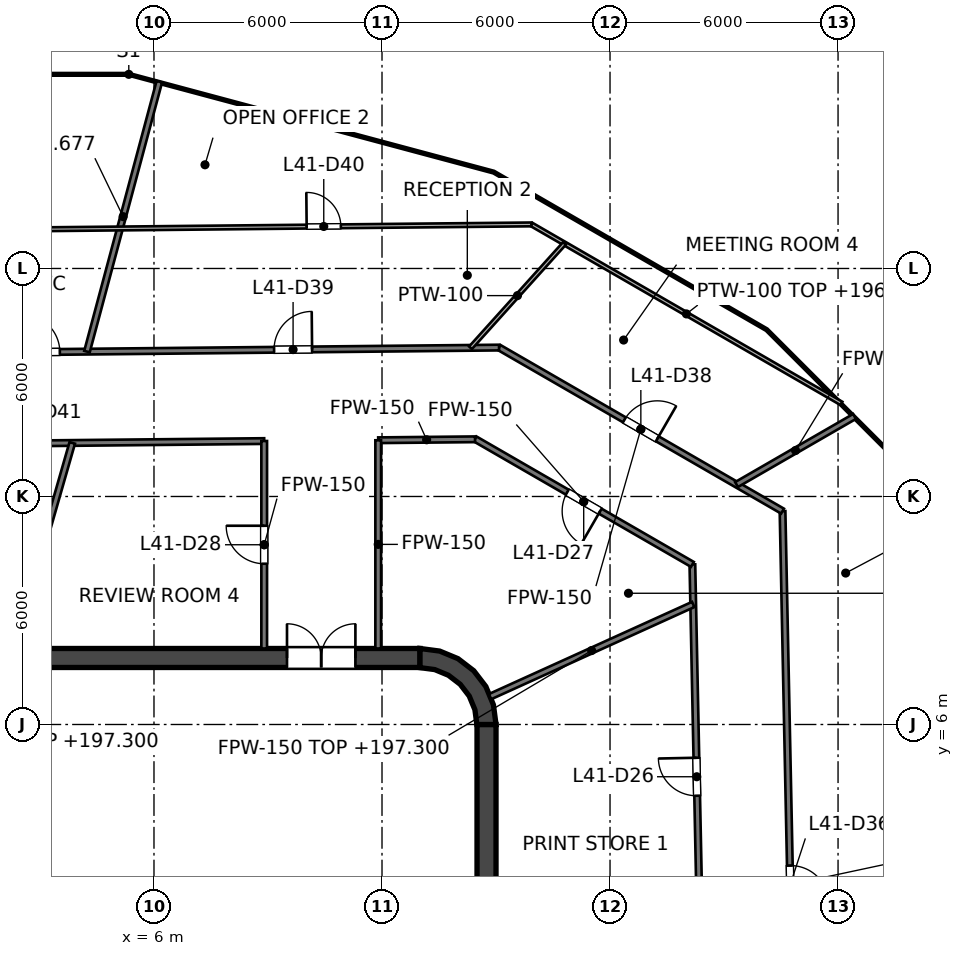
"""IFC4 building model, lengths in metres.
Left out: names, types, materials, properties, quantities, classifications, styles, units other than length and angle.
Written with IfcOpenShell. Run it as: python <this file> out.ifc"""

import sys

from ifc_helpers import new_model, si_unit, direction, frame, frame_2d, origin, place, context, subcontext, project, spatial, polyline, rectangle, outline, extrude, element, fill, save


model = new_model("IFC4")
c1 = context("Model", 3, precision=1e-05, world=origin(), true_north=direction((0.0, 1.0)))
c2 = subcontext(c1, "Body", "Model", "MODEL_VIEW")
j1 = project(units=[si_unit("LENGTHUNIT", "METRE"), si_unit("PLANEANGLEUNIT", "RADIAN")], contexts=[c1])
p1 = place(None, origin())
s1 = spatial("IfcSite", under=j1, at=p1, CompositionType="ELEMENT")
p2 = place(p1, origin())
s2 = spatial("IfcBuilding", under=s1, at=p2, CompositionType="ELEMENT")
p3 = place(p2, frame((0.0, 0.0, 193.6)))
s3 = spatial("IfcBuildingStorey", under=s2, at=p3, CompositionType="ELEMENT", Elevation=193.6)
p4 = place(p3, frame((-13.0, 7.75, 0.0), z_axis=(0.0, 0.0, 1.0), x_axis=(1.0, 0.0, 0.0)))
e1 = element("IfcWall", 1, at=p4, inside=s3, PredefinedType="SHEAR", context=c2, shape_type="SweptSolid", body=[
    extrude(rectangle(XDim=26.0, YDim=0.5, at=frame_2d((13.0, 0.0))), origin(), (0.0, 0.0, 1.0), 4.0),
])
p5 = place(p4, frame((1.7, 0.0, 0.0)))
e2 = element("IfcOpeningElement", 2, at=p5, cuts=e1, PredefinedType="OPENING", context=c2, shape_type="SweptSolid", body=[
    extrude(rectangle(XDim=1.8, YDim=2.1, at=frame_2d((0.9, 1.05))), frame((0.0, 0.25, 0.0), z_axis=(0.0, -1.0, 0.0), x_axis=(1.0, 0.0, 0.0)), (0.0, 0.0, 1.0), 0.5),
])
p6 = place(p4, frame((22.5, 0.0, 0.0)))
e3 = element("IfcOpeningElement", 3, at=p6, cuts=e1, PredefinedType="OPENING", context=c2, shape_type="SweptSolid", body=[
    extrude(rectangle(XDim=1.8, YDim=2.1, at=frame_2d((0.9, 1.05))), frame((0.0, 0.25, 0.0), z_axis=(0.0, -1.0, 0.0), x_axis=(1.0, 0.0, 0.0)), (0.0, 0.0, 1.0), 0.5),
])
p7 = place(p3, frame((14.75, -6.0, 0.0), z_axis=(0.0, 0.0, 1.0), x_axis=(0.0, 1.0, 0.0)))
e4 = element("IfcWall", 4, at=p7, inside=s3, PredefinedType="SHEAR", context=c2, shape_type="SweptSolid", body=[
    extrude(rectangle(XDim=12.0, YDim=0.5, at=frame_2d((6.0, 0.0))), origin(), (0.0, 0.0, 1.0), 4.0),
])
p8 = place(p3, origin())
e5 = element("IfcWall", 5, at=p8, inside=s3, PredefinedType="SHEAR", context=c2, shape_type="SweptSolid", body=[
    extrude(outline(polyline([(13.0, 8.0), (13.0, 7.496), (13.387, 7.445), (13.748, 7.295), (14.058, 7.058), (14.295, 6.748), (14.445, 6.387), (14.496, 6.0), (15.0, 6.0), (14.932, 6.518), (14.732, 7.0), (14.414, 7.414), (14.0, 7.732), (13.518, 7.932), (13.0, 8.0)])), origin(), (0.0, 0.0, 1.0), 4.0),
])
p9 = place(p3, frame((9.0, 4.1, 0.0), z_axis=(0.0, 0.0, 1.0), x_axis=(0.0, 1.0, 0.0)))
e6 = element("IfcWall", 6, at=p9, inside=s3, PredefinedType="SOLIDWALL", context=c2, shape_type="SweptSolid", body=[
    extrude(rectangle(XDim=2.5, YDim=0.25, at=frame_2d((1.25, 0.0))), origin(), (0.0, 0.0, 1.0), 3.7),
])
p10 = place(p9, frame((0.65, 0.0, 0.0)))
e7 = element("IfcOpeningElement", 7, at=p10, cuts=e6, PredefinedType="OPENING", context=c2, shape_type="SweptSolid", body=[
    extrude(rectangle(XDim=1.2, YDim=2.1, at=frame_2d((0.6, 1.05))), frame((0.0, 0.125, 0.0), z_axis=(0.0, -1.0, 0.0), x_axis=(1.0, 0.0, 0.0)), (0.0, 0.0, 1.0), 0.25),
])
p11 = place(p3, frame((-9.125, 7.05, 0.0), z_axis=(0.0, 0.0, 1.0), x_axis=(1.0, 0.0, 0.0)))
e8 = element("IfcWall", 8, at=p11, inside=s3, PredefinedType="SOLIDWALL", context=c2, shape_type="SweptSolid", body=[
    extrude(rectangle(XDim=18.25, YDim=0.9, at=frame_2d((9.125, 0.0))), origin(), (0.0, 0.0, 1.0), 3.7),
])
p12 = place(p3, frame((0.775, 3.975, 0.0), z_axis=(0.0, 0.0, 1.0), x_axis=(1.0, 0.0, 0.0)))
e9 = element("IfcWall", 9, at=p12, inside=s3, PredefinedType="SOLIDWALL", context=c2, shape_type="SweptSolid", body=[
    extrude(rectangle(XDim=8.35, YDim=0.25, at=frame_2d((4.175, 0.0))), origin(), (0.0, 0.0, 1.0), 3.7),
])
p13 = place(p3, frame((9.0, 1.65, 0.0), z_axis=(0.0, 0.0, 1.0), x_axis=(0.0, 1.0, 0.0)))
e10 = element("IfcWall", 10, at=p13, inside=s3, PredefinedType="PARTITIONING", context=c2, shape_type="SweptSolid", body=[
    extrude(rectangle(XDim=2.2, YDim=0.25, at=frame_2d((1.1, 0.0))), origin(), (0.0, 0.0, 1.0), 3.7),
])
p14 = place(p3, frame((11.8, -7.5, 0.0), z_axis=(0.0, 0.0, 1.0), x_axis=(0.0, 1.0, 0.0)))
e11 = element("IfcWall", 11, at=p14, inside=s3, PredefinedType="SOLIDWALL", context=c2, shape_type="SweptSolid", body=[
    extrude(rectangle(XDim=15.0, YDim=0.4, at=frame_2d((7.5, 0.0))), origin(), (0.0, 0.0, 1.0), 3.7),
])
p15 = place(p14, frame((11.3, 0.0, 0.0)))
e12 = element("IfcOpeningElement", 12, at=p15, cuts=e11, PredefinedType="OPENING", context=c2, shape_type="SweptSolid", body=[
    extrude(rectangle(XDim=1.1, YDim=2.1, at=frame_2d((0.55, 1.05))), frame((0.0, 0.2, 0.0), z_axis=(0.0, -1.0, 0.0), x_axis=(1.0, 0.0, 0.0)), (0.0, 0.0, 1.0), 0.4),
])
p16 = place(p14, frame((8.4, 0.0, 0.0)))
e13 = element("IfcOpeningElement", 13, at=p16, cuts=e11, PredefinedType="OPENING", context=c2, shape_type="SweptSolid", body=[
    extrude(rectangle(XDim=1.1, YDim=2.1, at=frame_2d((0.55, 1.05))), frame((0.0, 0.2, 0.0), z_axis=(0.0, -1.0, 0.0), x_axis=(1.0, 0.0, 0.0)), (0.0, 0.0, 1.0), 0.4),
])
p17 = place(p14, frame((5.5, 0.0, 0.0)))
e14 = element("IfcOpeningElement", 14, at=p17, cuts=e11, PredefinedType="OPENING", context=c2, shape_type="SweptSolid", body=[
    extrude(rectangle(XDim=1.1, YDim=2.1, at=frame_2d((0.55, 1.05))), frame((0.0, 0.2, 0.0), z_axis=(0.0, -1.0, 0.0), x_axis=(1.0, 0.0, 0.0)), (0.0, 0.0, 1.0), 0.4),
])
p18 = place(p14, frame((13.697, 0.0, 0.0)))
e15 = element("IfcOpeningElement", 15, at=p18, cuts=e11, PredefinedType="OPENING", context=c2, shape_type="SweptSolid", body=[
    extrude(rectangle(XDim=0.9, YDim=2.1, at=frame_2d((0.45, 1.05))), frame((0.0, 0.2, 0.0), z_axis=(0.0, -1.0, 0.0), x_axis=(1.0, 0.0, 0.0)), (0.0, 0.0, 1.0), 0.4),
])
p19 = place(p14, frame((0.403, 0.0, 0.0)))
e16 = element("IfcOpeningElement", 16, at=p19, cuts=e11, PredefinedType="OPENING", context=c2, shape_type="SweptSolid", body=[
    extrude(rectangle(XDim=0.9, YDim=2.1, at=frame_2d((0.45, 1.05))), frame((0.0, 0.2, 0.0), z_axis=(0.0, -1.0, 0.0), x_axis=(1.0, 0.0, 0.0)), (0.0, 0.0, 1.0), 0.4),
])
e17 = element("IfcWall", 17, at=p8, inside=s3, PredefinedType="SOLIDWALL", context=c2, shape_type="SweptSolid", body=[
    extrude(outline(polyline([(12.0, -5.675), (12.0, -5.925), (14.25, -5.925), (14.5, -5.925), (14.5, -5.675), (14.5, -3.025), (14.5, -2.775), (14.5, -0.125), (14.5, 0.125), (14.5, 2.775), (14.5, 3.025), (14.5, 5.675), (14.5, 5.925), (14.25, 5.925), (12.0, 5.925), (12.0, 5.675), (14.25, 5.675), (14.25, 3.025), (12.0, 3.025), (12.0, 2.775), (14.25, 2.775), (14.25, 0.125), (12.0, 0.125), (12.0, -0.125), (14.25, -0.125), (14.25, -2.775), (12.0, -2.775), (12.0, -3.025), (14.25, -3.025), (14.25, -5.675), (12.0, -5.675)])), origin(), (0.0, 0.0, 1.0), 3.7),
])
p20 = place(p3, frame((20.167, 10.213, 0.0), z_axis=(0.0, 0.0, 1.0), x_axis=(0.020624730832, -0.999787287616, 0.0)))
e18 = element("IfcWall", 18, at=p20, inside=s3, PredefinedType="PARTITIONING", context=c2, shape_type="SweptSolid", body=[
    extrude(rectangle(XDim=17.637, YDim=0.15, at=frame_2d((8.819, 0.0))), origin(), (0.0, 0.0, 1.0), 2.768),
])
p21 = place(p20, frame((10.508, 0.0, 0.0)))
e19 = element("IfcOpeningElement", 19, at=p21, cuts=e18, PredefinedType="OPENING", context=c2, shape_type="SweptSolid", body=[
    extrude(rectangle(XDim=1.0, YDim=2.1, at=frame_2d((0.5, 1.05))), frame((0.0, 0.075, 0.0), z_axis=(0.0, -1.0, 0.0), x_axis=(1.0, 0.0, 0.0)), (0.0, 0.0, 1.0), 0.15),
])
p22 = place(p20, frame((5.089, 0.0, 0.0)))
e20 = element("IfcOpeningElement", 20, at=p22, cuts=e18, PredefinedType="OPENING", context=c2, shape_type="SweptSolid", body=[
    extrude(rectangle(XDim=1.0, YDim=2.1, at=frame_2d((0.5, 1.05))), frame((0.0, 0.075, 0.0), z_axis=(0.0, -1.0, 0.0), x_axis=(1.0, 0.0, 0.0)), (0.0, 0.0, 1.0), 0.15),
])
p23 = place(p3, frame((22.539, 11.615, 0.0), z_axis=(0.0, 0.0, 1.0), x_axis=(0.020626332176, -0.99978725458, 0.0)))
e21 = element("IfcWall", 21, at=p23, inside=s3, PredefinedType="PARTITIONING", context=c2, shape_type="SweptSolid", body=[
    extrude(rectangle(XDim=19.66, YDim=0.15, at=frame_2d((9.83, 0.0))), origin(), (0.0, 0.0, 1.0), 2.768),
])
p24 = place(p23, frame((9.33, 0.0, 0.0)))
e22 = element("IfcOpeningElement", 22, at=p24, cuts=e21, PredefinedType="OPENING", context=c2, shape_type="SweptSolid", body=[
    extrude(rectangle(XDim=1.0, YDim=2.1, at=frame_2d((0.5, 1.05))), frame((0.0, 0.075, 0.0), z_axis=(0.0, -1.0, 0.0), x_axis=(1.0, 0.0, 0.0)), (0.0, 0.0, 1.0), 0.15),
])
p25 = place(p3, frame((14.448, 13.515, 0.0), z_axis=(0.0, 0.0, 1.0), x_axis=(0.866032288321, -0.499988075443, 0.0)))
e23 = element("IfcWall", 23, at=p25, inside=s3, PredefinedType="PARTITIONING", context=c2, shape_type="SweptSolid", body=[
    extrude(rectangle(XDim=6.604, YDim=0.15, at=frame_2d((3.302, 0.0))), origin(), (0.0, 0.0, 1.0), 2.777),
])
p26 = place(p25, frame((2.802, 0.0, 0.0)))
e24 = element("IfcOpeningElement", 24, at=p26, cuts=e23, PredefinedType="OPENING", context=c2, shape_type="SweptSolid", body=[
    extrude(rectangle(XDim=1.0, YDim=2.1, at=frame_2d((0.5, 1.05))), frame((0.0, 0.075, 0.0), z_axis=(0.0, -1.0, 0.0), x_axis=(1.0, 0.0, 0.0)), (0.0, 0.0, 1.0), 0.15),
])
p27 = place(p3, frame((15.08, 15.921, 0.0), z_axis=(0.0, 0.0, 1.0), x_axis=(0.866020838546, -0.500007907142, 0.0)))
e25 = element("IfcWall", 25, at=p27, inside=s3, PredefinedType="PARTITIONING", context=c2, shape_type="SweptSolid", body=[
    extrude(rectangle(XDim=8.613, YDim=0.15, at=frame_2d((4.306, 0.0))), origin(), (0.0, 0.0, 1.0), 2.777),
])
p28 = place(p27, frame((3.808, 0.0, 0.0)))
e26 = element("IfcOpeningElement", 26, at=p28, cuts=e25, PredefinedType="OPENING", context=c2, shape_type="SweptSolid", body=[
    extrude(rectangle(XDim=1.0, YDim=2.1, at=frame_2d((0.5, 1.05))), frame((0.0, 0.075, 0.0), z_axis=(0.0, -1.0, 0.0), x_axis=(1.0, 0.0, 0.0)), (0.0, 0.0, 1.0), 0.15),
])
p29 = place(p3, frame((-8.9, 13.282, 0.0), z_axis=(0.0, 0.0, 1.0), x_axis=(0.999951241216, 0.009874977968, 0.0)))
e27 = element("IfcWall", 27, at=p29, inside=s3, PredefinedType="PARTITIONING", context=c2, shape_type="SweptSolid", body=[
    extrude(rectangle(XDim=17.801, YDim=0.15, at=frame_2d((8.9, 0.0))), origin(), (0.0, 0.0, 1.0), 2.768),
])
p30 = place(p29, frame((8.413, 0.0, 0.0)))
e28 = element("IfcOpeningElement", 28, at=p30, cuts=e27, PredefinedType="OPENING", context=c2, shape_type="SweptSolid", body=[
    extrude(rectangle(XDim=1.0, YDim=2.1, at=frame_2d((0.5, 1.05))), frame((0.0, 0.075, 0.0), z_axis=(0.0, -1.0, 0.0), x_axis=(1.0, 0.0, 0.0)), (0.0, 0.0, 1.0), 0.15),
])
p31 = place(p3, frame((11.9, 13.48, 0.0), z_axis=(0.0, 0.0, 1.0), x_axis=(0.999951307579, 0.009868255694, 0.0)))
e29 = element("IfcWall", 29, at=p31, inside=s3, PredefinedType="PARTITIONING", context=c2, shape_type="SweptSolid", body=[
    extrude(rectangle(XDim=2.548, YDim=0.15, at=frame_2d((1.274, 0.0))), origin(), (0.0, 0.0, 1.0), 2.777),
])
p32 = place(p3, frame((-18.587, 15.586, 0.0), z_axis=(0.0, 0.0, 1.0), x_axis=(0.999951300332, 0.009868989991, 0.0)))
e30 = element("IfcWall", 30, at=p32, inside=s3, PredefinedType="PARTITIONING", context=c2, shape_type="SweptSolid", body=[
    extrude(rectangle(XDim=33.669, YDim=0.15, at=frame_2d((16.834, 0.0))), origin(), (0.0, 0.0, 1.0), 2.768),
])
p33 = place(p32, frame((27.749, 0.0, 0.0)))
e31 = element("IfcOpeningElement", 31, at=p33, cuts=e30, PredefinedType="OPENING", context=c2, shape_type="SweptSolid", body=[
    extrude(rectangle(XDim=1.0, YDim=2.1, at=frame_2d((0.5, 1.05))), frame((0.0, 0.075, 0.0), z_axis=(0.0, -1.0, 0.0), x_axis=(1.0, 0.0, 0.0)), (0.0, 0.0, 1.0), 0.15),
])
p34 = place(p32, frame((21.111, 0.0, 0.0)))
e32 = element("IfcOpeningElement", 32, at=p34, cuts=e30, PredefinedType="OPENING", context=c2, shape_type="SweptSolid", body=[
    extrude(rectangle(XDim=1.0, YDim=2.1, at=frame_2d((0.5, 1.05))), frame((0.0, 0.075, 0.0), z_axis=(0.0, -1.0, 0.0), x_axis=(1.0, 0.0, 0.0)), (0.0, 0.0, 1.0), 0.15),
])
p35 = place(p32, frame((12.139, 0.0, 0.0)))
e33 = element("IfcOpeningElement", 33, at=p35, cuts=e30, PredefinedType="OPENING", context=c2, shape_type="SweptSolid", body=[
    extrude(rectangle(XDim=1.0, YDim=2.1, at=frame_2d((0.5, 1.05))), frame((0.0, 0.075, 0.0), z_axis=(0.0, -1.0, 0.0), x_axis=(1.0, 0.0, 0.0)), (0.0, 0.0, 1.0), 0.15),
])
p36 = place(p32, frame((2.048, 0.0, 0.0)))
e34 = element("IfcOpeningElement", 34, at=p36, cuts=e30, PredefinedType="OPENING", context=c2, shape_type="SweptSolid", body=[
    extrude(rectangle(XDim=1.0, YDim=2.1, at=frame_2d((0.5, 1.05))), frame((0.0, 0.075, 0.0), z_axis=(0.0, -1.0, 0.0), x_axis=(1.0, 0.0, 0.0)), (0.0, 0.0, 1.0), 0.15),
])
p37 = place(p3, frame((14.843, 6.733, 0.0), z_axis=(0.0, 0.0, 1.0), x_axis=(0.910628361306, 0.413226315214, 0.0)))
e35 = element("IfcWall", 35, at=p37, inside=s3, PredefinedType="PARTITIONING", context=c2, shape_type="SweptSolid", body=[
    extrude(rectangle(XDim=5.87, YDim=0.15, at=frame_2d((2.935, 0.0))), origin(), (0.0, 0.0, 1.0), 3.7),
])
p38 = place(p3, frame((21.329, 12.314, 0.0), z_axis=(0.0, 0.0, 1.0), x_axis=(0.866038125567, 0.499977964579, 0.0)))
e36 = element("IfcWall", 36, at=p38, inside=s3, PredefinedType="PARTITIONING", context=c2, shape_type="SweptSolid", body=[
    extrude(rectangle(XDim=3.584, YDim=0.15, at=frame_2d((1.792, 0.0))), origin(), (0.0, 0.0, 1.0), 2.845),
])
p39 = place(p3, frame((2.296, 8.0, 0.0), z_axis=(0.0, 0.0, 1.0), x_axis=(0.275958345059, 0.961169595749, 0.0)))
e37 = element("IfcWall", 37, at=p39, inside=s3, PredefinedType="PARTITIONING", context=c2, shape_type="SweptSolid", body=[
    extrude(rectangle(XDim=5.628, YDim=0.15, at=frame_2d((2.814, 0.0))), origin(), (0.0, 0.0, 1.0), 3.7),
])
p40 = place(p3, frame((4.237, 15.813, 0.0), z_axis=(0.0, 0.0, 1.0), x_axis=(0.258799155252, 0.965931155539, 0.0)))
e38 = element("IfcWall", 38, at=p40, inside=s3, PredefinedType="PARTITIONING", context=c2, shape_type="SweptSolid", body=[
    extrude(rectangle(XDim=7.353, YDim=0.15, at=frame_2d((3.676, 0.0))), origin(), (0.0, 0.0, 1.0), 3.077),
])
p41 = place(p3, frame((11.9, 8.0, 0.0), z_axis=(0.0, 0.0, 1.0), x_axis=(0.0, 1.0, 0.0)))
e39 = element("IfcWall", 39, at=p41, inside=s3, PredefinedType="PARTITIONING", context=c2, shape_type="SweptSolid", body=[
    extrude(rectangle(XDim=5.479, YDim=0.15, at=frame_2d((2.74, 0.0))), origin(), (0.0, 0.0, 1.0), 2.777),
])
p42 = place(p3, frame((8.9, 8.0, 0.0), z_axis=(0.0, 0.0, 1.0), x_axis=(0.0, 1.0, 0.0)))
e40 = element("IfcWall", 40, at=p42, inside=s3, PredefinedType="PARTITIONING", context=c2, shape_type="SweptSolid", body=[
    extrude(rectangle(XDim=5.46, YDim=0.15, at=frame_2d((2.73, 0.0))), origin(), (0.0, 0.0, 1.0), 2.777),
])
p43 = place(p42, frame((2.23, 0.0, 0.0)))
e41 = element("IfcOpeningElement", 41, at=p43, cuts=e40, PredefinedType="OPENING", context=c2, shape_type="SweptSolid", body=[
    extrude(rectangle(XDim=1.0, YDim=2.1, at=frame_2d((0.5, 1.05))), frame((0.0, 0.075, 0.0), z_axis=(0.0, -1.0, 0.0), x_axis=(1.0, 0.0, 0.0)), (0.0, 0.0, 1.0), 0.15),
])
p44 = place(p3, frame((15.931, 19.16, 0.0), z_axis=(0.0, 0.0, 1.0), x_axis=(0.86598056092, -0.500077662076, 0.0)))
e42 = element("IfcWall", 42, at=p44, inside=s3, PredefinedType="PARTITIONING", context=c2, shape_type="SweptSolid", body=[
    extrude(rectangle(XDim=9.42, YDim=0.1, at=frame_2d((4.71, 0.0))), origin(), (0.0, 0.0, 1.0), 2.777),
])
p45 = place(p3, frame((-17.945, 18.824, 0.0), z_axis=(0.0, 0.0, 1.0), x_axis=(0.999950833273, 0.009916200716, 0.0)))
e43 = element("IfcWall", 43, at=p45, inside=s3, PredefinedType="PARTITIONING", context=c2, shape_type="SweptSolid", body=[
    extrude(rectangle(XDim=33.878, YDim=0.1, at=frame_2d((16.939, 0.0))), origin(), (0.0, 0.0, 1.0), 2.768),
])
p46 = place(p45, frame((27.964, 0.0, 0.0)))
e44 = element("IfcOpeningElement", 44, at=p46, cuts=e43, PredefinedType="OPENING", context=c2, shape_type="SweptSolid", body=[
    extrude(rectangle(XDim=0.9, YDim=2.1, at=frame_2d((0.45, 1.05))), frame((0.0, 0.05, 0.0), z_axis=(0.0, -1.0, 0.0), x_axis=(1.0, 0.0, 0.0)), (0.0, 0.0, 1.0), 0.1),
])
p47 = place(p45, frame((10.39, 0.0, 0.0)))
e45 = element("IfcOpeningElement", 45, at=p47, cuts=e43, PredefinedType="OPENING", context=c2, shape_type="SweptSolid", body=[
    extrude(rectangle(XDim=0.9, YDim=2.1, at=frame_2d((0.45, 1.05))), frame((0.0, 0.05, 0.0), z_axis=(0.0, -1.0, 0.0), x_axis=(1.0, 0.0, 0.0)), (0.0, 0.0, 1.0), 0.1),
])
p48 = place(p3, frame((14.329, 15.914, 0.0), z_axis=(0.0, 0.0, 1.0), x_axis=(0.669180226247, 0.74310014453, 0.0)))
e46 = element("IfcWall", 46, at=p48, inside=s3, PredefinedType="PARTITIONING", context=c2, shape_type="SweptSolid", body=[
    extrude(rectangle(XDim=3.692, YDim=0.1, at=frame_2d((1.846, 0.0))), origin(), (0.0, 0.0, 1.0), 3.7),
])
p49 = place(p15, origin())
e47 = element("IfcDoor", 47, at=p49, inside=s3, OperationType="DOUBLE_DOOR_SLIDING", PredefinedType="DOOR", context=c2, shape_type="SweptSolid", body=[
    extrude(rectangle(XDim=1.1, YDim=2.1, at=frame_2d((0.55, 1.05))), frame((0.0, 0.025, 0.0), z_axis=(0.0, -1.0, 0.0), x_axis=(1.0, 0.0, 0.0)), (0.0, 0.0, 1.0), 0.05),
])
fill(e12, e47)
p50 = place(p10, origin())
e48 = element("IfcDoor", 48, at=p50, inside=s3, OperationType="SINGLE_SWING_LEFT", PredefinedType="DOOR", context=c2, shape_type="SweptSolid", body=[
    extrude(rectangle(XDim=1.2, YDim=2.1, at=frame_2d((0.6, 1.05))), frame((0.0, 0.025, 0.0), z_axis=(0.0, -1.0, 0.0), x_axis=(1.0, 0.0, 0.0)), (0.0, 0.0, 1.0), 0.05),
])
fill(e7, e48)
p51 = place(p18, origin())
e49 = element("IfcDoor", 49, at=p51, inside=s3, OperationType="SINGLE_SWING_RIGHT", PredefinedType="DOOR", context=c2, shape_type="SweptSolid", body=[
    extrude(rectangle(XDim=0.9, YDim=2.1, at=frame_2d((0.45, 1.05))), frame((0.0, 0.025, 0.0), z_axis=(0.0, -1.0, 0.0), x_axis=(1.0, 0.0, 0.0)), (0.0, 0.0, 1.0), 0.05),
])
fill(e15, e49)
p52 = place(p6, origin())
e50 = element("IfcDoor", 50, at=p52, inside=s3, OperationType="DOUBLE_DOOR_SINGLE_SWING", PredefinedType="DOOR", context=c2, shape_type="SweptSolid", body=[
    extrude(rectangle(XDim=1.8, YDim=2.1, at=frame_2d((0.9, 1.05))), frame((0.0, 0.025, 0.0), z_axis=(0.0, -1.0, 0.0), x_axis=(1.0, 0.0, 0.0)), (0.0, 0.0, 1.0), 0.05),
])
fill(e3, e50)
p53 = place(p22, origin())
e51 = element("IfcDoor", 51, at=p53, inside=s3, OperationType="SINGLE_SWING_LEFT", PredefinedType="DOOR", context=c2, shape_type="SweptSolid", body=[
    extrude(rectangle(XDim=1.0, YDim=2.1, at=frame_2d((0.5, 1.05))), frame((0.0, 0.025, 0.0), z_axis=(0.0, -1.0, 0.0), x_axis=(1.0, 0.0, 0.0)), (0.0, 0.0, 1.0), 0.05),
])
fill(e20, e51)
p54 = place(p26, origin())
e52 = element("IfcDoor", 52, at=p54, inside=s3, OperationType="SINGLE_SWING_RIGHT", PredefinedType="DOOR", context=c2, shape_type="SweptSolid", body=[
    extrude(rectangle(XDim=1.0, YDim=2.1, at=frame_2d((0.5, 1.05))), frame((0.0, 0.025, 0.0), z_axis=(0.0, -1.0, 0.0), x_axis=(1.0, 0.0, 0.0)), (0.0, 0.0, 1.0), 0.05),
])
fill(e24, e52)
p55 = place(p43, origin())
e53 = element("IfcDoor", 53, at=p55, inside=s3, OperationType="SINGLE_SWING_RIGHT", PredefinedType="DOOR", context=c2, shape_type="SweptSolid", body=[
    extrude(rectangle(XDim=1.0, YDim=2.1, at=frame_2d((0.5, 1.05))), frame((0.0, 0.025, 0.0), z_axis=(0.0, -1.0, 0.0), x_axis=(1.0, 0.0, 0.0)), (0.0, 0.0, 1.0), 0.05),
])
fill(e41, e53)
p56 = place(p24, origin())
e54 = element("IfcDoor", 54, at=p56, inside=s3, OperationType="SINGLE_SWING_RIGHT", PredefinedType="DOOR", context=c2, shape_type="SweptSolid", body=[
    extrude(rectangle(XDim=1.0, YDim=2.1, at=frame_2d((0.5, 1.05))), frame((0.0, 0.025, 0.0), z_axis=(0.0, -1.0, 0.0), x_axis=(1.0, 0.0, 0.0)), (0.0, 0.0, 1.0), 0.05),
])
fill(e22, e54)
p57 = place(p28, origin())
e55 = element("IfcDoor", 55, at=p57, inside=s3, OperationType="SINGLE_SWING_RIGHT", PredefinedType="DOOR", context=c2, shape_type="SweptSolid", body=[
    extrude(rectangle(XDim=1.0, YDim=2.1, at=frame_2d((0.5, 1.05))), frame((0.0, 0.025, 0.0), z_axis=(0.0, -1.0, 0.0), x_axis=(1.0, 0.0, 0.0)), (0.0, 0.0, 1.0), 0.05),
])
fill(e26, e55)
p58 = place(p33, origin())
e56 = element("IfcDoor", 56, at=p58, inside=s3, OperationType="SINGLE_SWING_RIGHT", PredefinedType="DOOR", context=c2, shape_type="SweptSolid", body=[
    extrude(rectangle(XDim=1.0, YDim=2.1, at=frame_2d((0.5, 1.05))), frame((0.0, 0.025, 0.0), z_axis=(0.0, -1.0, 0.0), x_axis=(1.0, 0.0, 0.0)), (0.0, 0.0, 1.0), 0.05),
])
fill(e31, e56)
p59 = place(p46, origin())
e57 = element("IfcDoor", 57, at=p59, inside=s3, OperationType="SINGLE_SWING_LEFT", PredefinedType="DOOR", context=c2, shape_type="SweptSolid", body=[
    extrude(rectangle(XDim=0.9, YDim=2.1, at=frame_2d((0.45, 1.05))), frame((0.0, 0.025, 0.0), z_axis=(0.0, -1.0, 0.0), x_axis=(1.0, 0.0, 0.0)), (0.0, 0.0, 1.0), 0.05),
])
fill(e44, e57)
p60 = place(p34, origin())
e58 = element("IfcDoor", 58, at=p60, inside=s3, OperationType="SINGLE_SWING_LEFT", PredefinedType="DOOR", context=c2, shape_type="SweptSolid", body=[
    extrude(rectangle(XDim=1.0, YDim=2.1, at=frame_2d((0.5, 1.05))), frame((0.0, 0.025, 0.0), z_axis=(0.0, -1.0, 0.0), x_axis=(1.0, 0.0, 0.0)), (0.0, 0.0, 1.0), 0.05),
])
fill(e32, e58)
save(model, sys.argv[1])
